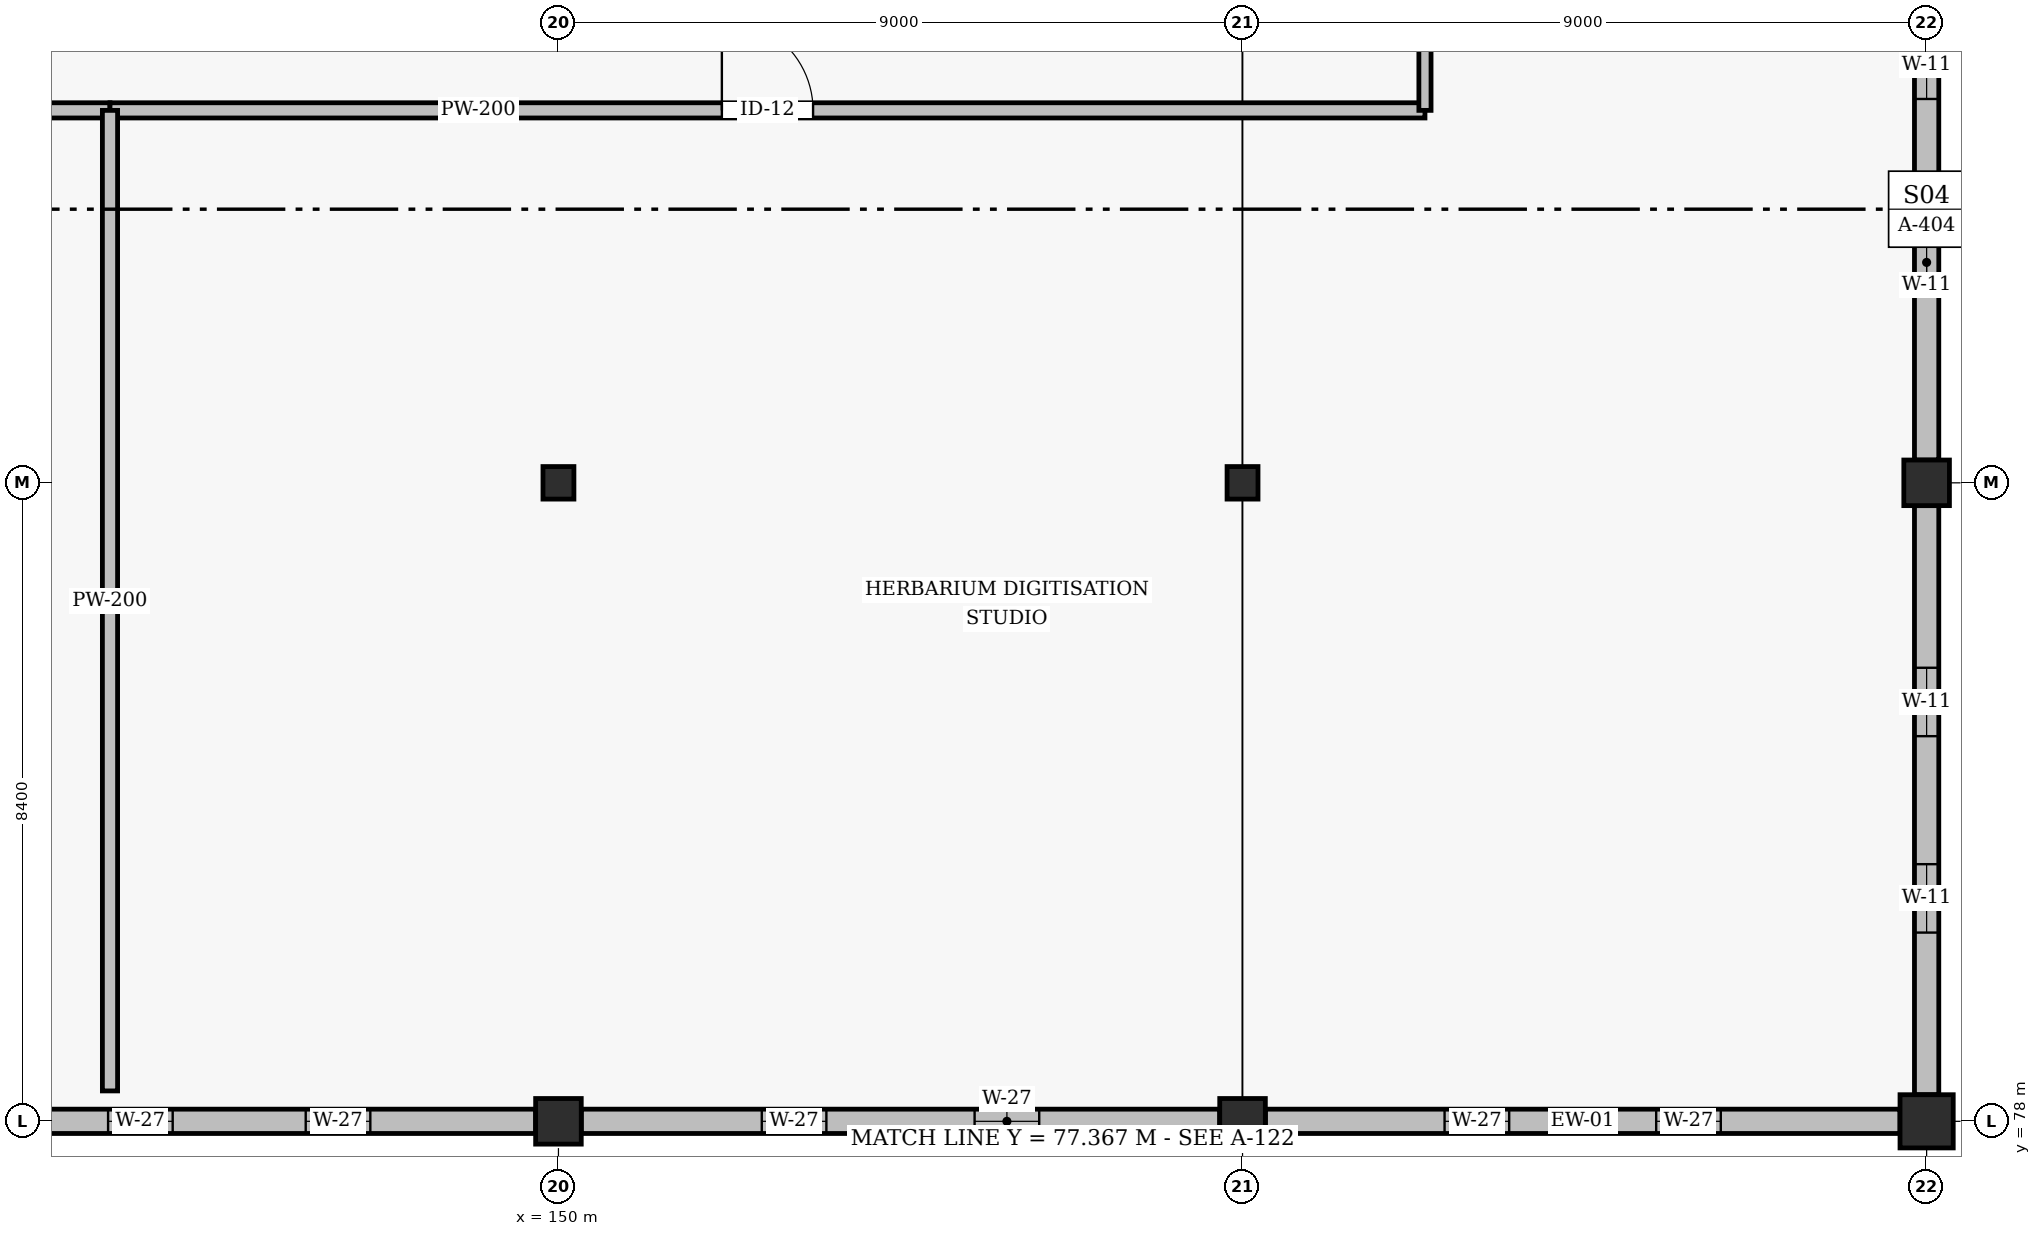
"""IFC4 building model, lengths in metres.
Left out: names, types, materials, properties, quantities, classifications, styles, units other than length and angle.
Written with IfcOpenShell. Run it as: python <this file> out.ifc"""

import sys

from ifc_helpers import new_model, si_unit, direction, frame, frame_2d, origin, origin_2d, place, context, subcontext, project, spatial, rectangle, hollow_rectangle, i_section, extrude, element, fill, save


model = new_model("IFC4")
c1 = context("Model", 3, precision=1e-05, world=origin(), true_north=direction((0.0, 1.0)))
c2 = subcontext(c1, "Body", "Model", "MODEL_VIEW")
j1 = project(units=[si_unit("LENGTHUNIT", "METRE"), si_unit("PLANEANGLEUNIT", "RADIAN")], contexts=[c1])
p1 = place(None, origin())
s1 = spatial("IfcSite", under=j1, at=p1, CompositionType="ELEMENT")
p2 = place(p1, origin())
s2 = spatial("IfcBuilding", under=s1, at=p2, CompositionType="ELEMENT")
p3 = place(p2, frame((0.0, 0.0, 4.8)))
s3 = spatial("IfcBuildingStorey", under=s2, at=p3, CompositionType="ELEMENT", Elevation=4.8)
p4 = place(p3, frame((150.0, 78.0, 0.0), z_axis=(0.0, 0.0, 1.0), x_axis=(1.0, 0.0, 0.0)))
e1 = element("IfcColumn", 1, at=p4, inside=s3, PredefinedType="COLUMN", context=c2, shape_type="SweptSolid", body=[
    extrude(hollow_rectangle(XDim=0.6, YDim=0.6, WallThickness=0.025, InnerFilletRadius=0.025, OuterFilletRadius=0.05, at=origin_2d()), origin(), (0.0, 0.0, 1.0), 4.2),
])
p5 = place(p3, frame((150.0, 86.4, 0.0), z_axis=(0.0, 0.0, 1.0), x_axis=(1.0, 0.0, 0.0)))
e2 = element("IfcColumn", 2, at=p5, inside=s3, PredefinedType="COLUMN", context=c2, shape_type="SweptSolid", body=[
    extrude(i_section(OverallWidth=0.407, OverallDepth=0.428, WebThickness=0.02, FlangeThickness=0.035, FilletRadius=0.022, at=origin_2d()), origin(), (0.0, 0.0, 1.0), 4.2),
])
p6 = place(p3, frame((159.0, 78.0, 0.0), z_axis=(0.0, 0.0, 1.0), x_axis=(1.0, 0.0, 0.0)))
e3 = element("IfcColumn", 3, at=p6, inside=s3, PredefinedType="COLUMN", context=c2, shape_type="SweptSolid", body=[
    extrude(hollow_rectangle(XDim=0.6, YDim=0.6, WallThickness=0.025, InnerFilletRadius=0.025, OuterFilletRadius=0.05, at=origin_2d()), origin(), (0.0, 0.0, 1.0), 4.2),
])
p7 = place(p3, frame((159.0, 86.4, 0.0), z_axis=(0.0, 0.0, 1.0), x_axis=(1.0, 0.0, 0.0)))
e4 = element("IfcColumn", 4, at=p7, inside=s3, PredefinedType="COLUMN", context=c2, shape_type="SweptSolid", body=[
    extrude(i_section(OverallWidth=0.407, OverallDepth=0.428, WebThickness=0.02, FlangeThickness=0.035, FilletRadius=0.022, at=origin_2d()), origin(), (0.0, 0.0, 1.0), 4.2),
])
p8 = place(p3, frame((168.0, 78.0, 0.0), z_axis=(0.0, 0.0, 1.0), x_axis=(1.0, 0.0, 0.0)))
e5 = element("IfcColumn", 5, at=p8, inside=s3, PredefinedType="COLUMN", context=c2, shape_type="SweptSolid", body=[
    extrude(hollow_rectangle(XDim=0.7, YDim=0.7, WallThickness=0.032, InnerFilletRadius=0.032, OuterFilletRadius=0.064, at=origin_2d()), origin(), (0.0, 0.0, 1.0), 4.2),
])
p9 = place(p3, frame((168.0, 86.4, 0.0), z_axis=(0.0, 0.0, 1.0), x_axis=(1.0, 0.0, 0.0)))
e6 = element("IfcColumn", 6, at=p9, inside=s3, PredefinedType="COLUMN", context=c2, shape_type="SweptSolid", body=[
    extrude(hollow_rectangle(XDim=0.6, YDim=0.6, WallThickness=0.025, InnerFilletRadius=0.025, OuterFilletRadius=0.05, at=origin_2d()), origin(), (0.0, 0.0, 1.0), 4.2),
])
p10 = place(p3, frame((141.9, 78.0, 0.0), z_axis=(0.0, 0.0, 1.0), x_axis=(1.0, 0.0, 0.0)))
e7 = element("IfcWall", 7, at=p10, inside=s3, PredefinedType="SOLIDWALL", context=c2, shape_type="SweptSolid", body=[
    extrude(rectangle(XDim=7.8, YDim=0.32, at=frame_2d((3.9, 0.0))), origin(), (0.0, 0.0, 1.0), 3.263),
])
p11 = place(p10, frame((2.175, 0.0, 1.1)))
e8 = element("IfcOpeningElement", 8, at=p11, cuts=e7, PredefinedType="OPENING", context=c2, shape_type="SweptSolid", body=[
    extrude(rectangle(XDim=0.85, YDim=1.45, at=frame_2d((0.425, 0.725))), frame((0.0, 0.17, 0.0), z_axis=(0.0, -1.0, 0.0), x_axis=(1.0, 0.0, 0.0)), (0.0, 0.0, 1.0), 0.34),
])
p12 = place(p10, frame((4.775, 0.0, 1.1)))
e9 = element("IfcOpeningElement", 9, at=p12, cuts=e7, PredefinedType="OPENING", context=c2, shape_type="SweptSolid", body=[
    extrude(rectangle(XDim=0.85, YDim=1.45, at=frame_2d((0.425, 0.725))), frame((0.0, 0.17, 0.0), z_axis=(0.0, -1.0, 0.0), x_axis=(1.0, 0.0, 0.0)), (0.0, 0.0, 1.0), 0.34),
])
p13 = place(p3, frame((150.3, 78.0, 0.0), z_axis=(0.0, 0.0, 1.0), x_axis=(1.0, 0.0, 0.0)))
e10 = element("IfcWall", 10, at=p13, inside=s3, PredefinedType="SOLIDWALL", context=c2, shape_type="SweptSolid", body=[
    extrude(rectangle(XDim=8.4, YDim=0.32, at=frame_2d((4.2, 0.0))), origin(), (0.0, 0.0, 1.0), 3.163),
])
p14 = place(p13, frame((2.375, 0.0, 1.1)))
e11 = element("IfcOpeningElement", 11, at=p14, cuts=e10, PredefinedType="OPENING", context=c2, shape_type="SweptSolid", body=[
    extrude(rectangle(XDim=0.85, YDim=1.45, at=frame_2d((0.425, 0.725))), frame((0.0, 0.17, 0.0), z_axis=(0.0, -1.0, 0.0), x_axis=(1.0, 0.0, 0.0)), (0.0, 0.0, 1.0), 0.34),
])
p15 = place(p13, frame((5.175, 0.0, 1.1)))
e12 = element("IfcOpeningElement", 12, at=p15, cuts=e10, PredefinedType="OPENING", context=c2, shape_type="SweptSolid", body=[
    extrude(rectangle(XDim=0.85, YDim=1.45, at=frame_2d((0.425, 0.725))), frame((0.0, 0.17, 0.0), z_axis=(0.0, -1.0, 0.0), x_axis=(1.0, 0.0, 0.0)), (0.0, 0.0, 1.0), 0.34),
])
p16 = place(p3, frame((159.3, 78.0, 0.0), z_axis=(0.0, 0.0, 1.0), x_axis=(1.0, 0.0, 0.0)))
e13 = element("IfcWall", 13, at=p16, inside=s3, PredefinedType="SOLIDWALL", context=c2, shape_type="SweptSolid", body=[
    extrude(rectangle(XDim=8.35, YDim=0.32, at=frame_2d((4.175, 0.0))), origin(), (0.0, 0.0, 1.0), 3.163),
])
p17 = place(p16, frame((2.358, 0.0, 1.1)))
e14 = element("IfcOpeningElement", 14, at=p17, cuts=e13, PredefinedType="OPENING", context=c2, shape_type="SweptSolid", body=[
    extrude(rectangle(XDim=0.85, YDim=1.45, at=frame_2d((0.425, 0.725))), frame((0.0, 0.17, 0.0), z_axis=(0.0, -1.0, 0.0), x_axis=(1.0, 0.0, 0.0)), (0.0, 0.0, 1.0), 0.34),
])
p18 = place(p16, frame((5.142, 0.0, 1.1)))
e15 = element("IfcOpeningElement", 15, at=p18, cuts=e13, PredefinedType="OPENING", context=c2, shape_type="SweptSolid", body=[
    extrude(rectangle(XDim=0.85, YDim=1.45, at=frame_2d((0.425, 0.725))), frame((0.0, 0.17, 0.0), z_axis=(0.0, -1.0, 0.0), x_axis=(1.0, 0.0, 0.0)), (0.0, 0.0, 1.0), 0.34),
])
p19 = place(p3, frame((168.0, 78.35, 0.0), z_axis=(0.0, 0.0, 1.0), x_axis=(0.0, 1.0, 0.0)))
e16 = element("IfcWall", 16, at=p19, inside=s3, PredefinedType="SOLIDWALL", context=c2, shape_type="SweptSolid", body=[
    extrude(rectangle(XDim=7.75, YDim=0.32, at=frame_2d((3.875, 0.0))), origin(), (0.0, 0.0, 1.0), 3.455),
])
p20 = place(p19, frame((2.133, 0.0, 1.1)))
e17 = element("IfcOpeningElement", 17, at=p20, cuts=e16, PredefinedType="OPENING", context=c2, shape_type="SweptSolid", body=[
    extrude(rectangle(XDim=0.9, YDim=1.5, at=frame_2d((0.45, 0.75))), frame((0.0, 0.17, 0.0), z_axis=(0.0, -1.0, 0.0), x_axis=(1.0, 0.0, 0.0)), (0.0, 0.0, 1.0), 0.34),
])
p21 = place(p19, frame((4.717, 0.0, 1.1)))
e18 = element("IfcOpeningElement", 18, at=p21, cuts=e16, PredefinedType="OPENING", context=c2, shape_type="SweptSolid", body=[
    extrude(rectangle(XDim=0.9, YDim=1.5, at=frame_2d((0.45, 0.75))), frame((0.0, 0.17, 0.0), z_axis=(0.0, -1.0, 0.0), x_axis=(1.0, 0.0, 0.0)), (0.0, 0.0, 1.0), 0.34),
])
p22 = place(p3, frame((168.0, 86.7, 0.0), z_axis=(0.0, 0.0, 1.0), x_axis=(0.0, 1.0, 0.0)))
e19 = element("IfcWall", 19, at=p22, inside=s3, PredefinedType="SOLIDWALL", context=c2, shape_type="SweptSolid", body=[
    extrude(rectangle(XDim=7.8, YDim=0.32, at=frame_2d((3.9, 0.0))), origin(), (0.0, 0.0, 1.0), 3.455),
])
p23 = place(p22, frame((2.15, 0.0, 1.1)))
e20 = element("IfcOpeningElement", 20, at=p23, cuts=e19, PredefinedType="OPENING", context=c2, shape_type="SweptSolid", body=[
    extrude(rectangle(XDim=0.9, YDim=1.5, at=frame_2d((0.45, 0.75))), frame((0.0, 0.17, 0.0), z_axis=(0.0, -1.0, 0.0), x_axis=(1.0, 0.0, 0.0)), (0.0, 0.0, 1.0), 0.34),
])
p24 = place(p22, frame((4.75, 0.0, 1.1)))
e21 = element("IfcOpeningElement", 21, at=p24, cuts=e19, PredefinedType="OPENING", context=c2, shape_type="SweptSolid", body=[
    extrude(rectangle(XDim=0.9, YDim=1.5, at=frame_2d((0.45, 0.75))), frame((0.0, 0.17, 0.0), z_axis=(0.0, -1.0, 0.0), x_axis=(1.0, 0.0, 0.0)), (0.0, 0.0, 1.0), 0.34),
])
p25 = place(p3, frame((116.8, 91.3, 0.0), z_axis=(0.0, 0.0, 1.0), x_axis=(1.0, 0.0, 0.0)))
e22 = element("IfcWall", 22, at=p25, inside=s3, PredefinedType="SOLIDWALL", context=c2, shape_type="SweptSolid", body=[
    extrude(rectangle(XDim=27.3, YDim=0.2, at=frame_2d((13.65, 0.0))), origin(), (0.0, 0.0, 1.0), 3.455),
])
p26 = place(p25, frame((12.95, 0.0, 0.0)))
e23 = element("IfcOpeningElement", 23, at=p26, cuts=e22, PredefinedType="OPENING", context=c2, shape_type="SweptSolid", body=[
    extrude(rectangle(XDim=1.42, YDim=2.18, at=frame_2d((0.71, 1.09))), frame((0.0, 0.11, 0.0), z_axis=(0.0, -1.0, 0.0), x_axis=(1.0, 0.0, 0.0)), (0.0, 0.0, 1.0), 0.22),
])
p27 = place(p3, frame((144.1, 91.3, 0.0), z_axis=(0.0, 0.0, 1.0), x_axis=(1.0, 0.0, 0.0)))
e24 = element("IfcWall", 24, at=p27, inside=s3, PredefinedType="SOLIDWALL", context=c2, shape_type="SweptSolid", body=[
    extrude(rectangle(XDim=17.3, YDim=0.2, at=frame_2d((8.65, 0.0))), origin(), (0.0, 0.0, 1.0), 3.455),
])
p28 = place(p27, frame((8.05, 0.0, 0.0)))
e25 = element("IfcOpeningElement", 25, at=p28, cuts=e24, PredefinedType="OPENING", context=c2, shape_type="SweptSolid", body=[
    extrude(rectangle(XDim=1.2, YDim=2.08, at=frame_2d((0.6, 1.04))), frame((0.0, 0.11, 0.0), z_axis=(0.0, -1.0, 0.0), x_axis=(1.0, 0.0, 0.0)), (0.0, 0.0, 1.0), 0.22),
])
p29 = place(p3, frame((144.1, 78.4, 0.0), z_axis=(0.0, 0.0, 1.0), x_axis=(0.0, 1.0, 0.0)))
e26 = element("IfcWall", 26, at=p29, inside=s3, PredefinedType="SOLIDWALL", context=c2, shape_type="SweptSolid", body=[
    extrude(rectangle(XDim=12.9, YDim=0.2, at=frame_2d((6.45, 0.0))), origin(), (0.0, 0.0, 1.0), 3.459),
])
p30 = place(p3, frame((161.4, 91.3, 0.0), z_axis=(0.0, 0.0, 1.0), x_axis=(0.0, 1.0, 0.0)))
e27 = element("IfcWall", 27, at=p30, inside=s3, PredefinedType="PARTITIONING", context=c2, shape_type="SweptSolid", body=[
    extrude(rectangle(XDim=15.1, YDim=0.16, at=frame_2d((7.55, 0.0))), origin(), (0.0, 0.0, 1.0), 3.305),
])
p31 = place(p30, frame((7.0, 0.0, 0.0)))
e28 = element("IfcOpeningElement", 28, at=p31, cuts=e27, PredefinedType="OPENING", context=c2, shape_type="SweptSolid", body=[
    extrude(rectangle(XDim=1.08, YDim=2.08, at=frame_2d((0.54, 1.04))), frame((0.0, 0.09, 0.0), z_axis=(0.0, -1.0, 0.0), x_axis=(1.0, 0.0, 0.0)), (0.0, 0.0, 1.0), 0.18),
])
p32 = place(p11, origin())
e29 = element("IfcWindow", 29, at=p32, inside=s3, PartitioningType="SINGLE_PANEL", PredefinedType="WINDOW", context=c2, shape_type="SweptSolid", body=[
    extrude(rectangle(XDim=0.85, YDim=1.45, at=frame_2d((0.425, 0.725))), frame((0.0, 0.03, 0.0), z_axis=(0.0, -1.0, 0.0), x_axis=(1.0, 0.0, 0.0)), (0.0, 0.0, 1.0), 0.06),
])
fill(e8, e29)
p33 = place(p12, origin())
e30 = element("IfcWindow", 30, at=p33, inside=s3, PartitioningType="SINGLE_PANEL", PredefinedType="WINDOW", context=c2, shape_type="SweptSolid", body=[
    extrude(rectangle(XDim=0.85, YDim=1.45, at=frame_2d((0.425, 0.725))), frame((0.0, 0.03, 0.0), z_axis=(0.0, -1.0, 0.0), x_axis=(1.0, 0.0, 0.0)), (0.0, 0.0, 1.0), 0.06),
])
fill(e9, e30)
p34 = place(p14, origin())
e31 = element("IfcWindow", 31, at=p34, inside=s3, PartitioningType="SINGLE_PANEL", PredefinedType="WINDOW", context=c2, shape_type="SweptSolid", body=[
    extrude(rectangle(XDim=0.85, YDim=1.45, at=frame_2d((0.425, 0.725))), frame((0.0, 0.03, 0.0), z_axis=(0.0, -1.0, 0.0), x_axis=(1.0, 0.0, 0.0)), (0.0, 0.0, 1.0), 0.06),
])
fill(e11, e31)
p35 = place(p15, origin())
e32 = element("IfcWindow", 32, at=p35, inside=s3, PartitioningType="SINGLE_PANEL", PredefinedType="WINDOW", context=c2, shape_type="SweptSolid", body=[
    extrude(rectangle(XDim=0.85, YDim=1.45, at=frame_2d((0.425, 0.725))), frame((0.0, 0.03, 0.0), z_axis=(0.0, -1.0, 0.0), x_axis=(1.0, 0.0, 0.0)), (0.0, 0.0, 1.0), 0.06),
])
fill(e12, e32)
p36 = place(p17, origin())
e33 = element("IfcWindow", 33, at=p36, inside=s3, PartitioningType="SINGLE_PANEL", PredefinedType="WINDOW", context=c2, shape_type="SweptSolid", body=[
    extrude(rectangle(XDim=0.85, YDim=1.45, at=frame_2d((0.425, 0.725))), frame((0.0, 0.03, 0.0), z_axis=(0.0, -1.0, 0.0), x_axis=(1.0, 0.0, 0.0)), (0.0, 0.0, 1.0), 0.06),
])
fill(e14, e33)
p37 = place(p18, origin())
e34 = element("IfcWindow", 34, at=p37, inside=s3, PartitioningType="SINGLE_PANEL", PredefinedType="WINDOW", context=c2, shape_type="SweptSolid", body=[
    extrude(rectangle(XDim=0.85, YDim=1.45, at=frame_2d((0.425, 0.725))), frame((0.0, 0.03, 0.0), z_axis=(0.0, -1.0, 0.0), x_axis=(1.0, 0.0, 0.0)), (0.0, 0.0, 1.0), 0.06),
])
fill(e15, e34)
p38 = place(p20, origin())
e35 = element("IfcWindow", 35, at=p38, inside=s3, PartitioningType="SINGLE_PANEL", PredefinedType="WINDOW", context=c2, shape_type="SweptSolid", body=[
    extrude(rectangle(XDim=0.9, YDim=1.5, at=frame_2d((0.45, 0.75))), frame((0.0, 0.03, 0.0), z_axis=(0.0, -1.0, 0.0), x_axis=(1.0, 0.0, 0.0)), (0.0, 0.0, 1.0), 0.06),
])
fill(e17, e35)
p39 = place(p21, origin())
e36 = element("IfcWindow", 36, at=p39, inside=s3, PartitioningType="SINGLE_PANEL", PredefinedType="WINDOW", context=c2, shape_type="SweptSolid", body=[
    extrude(rectangle(XDim=0.9, YDim=1.5, at=frame_2d((0.45, 0.75))), frame((0.0, 0.03, 0.0), z_axis=(0.0, -1.0, 0.0), x_axis=(1.0, 0.0, 0.0)), (0.0, 0.0, 1.0), 0.06),
])
fill(e18, e36)
p40 = place(p23, origin())
e37 = element("IfcWindow", 37, at=p40, inside=s3, PartitioningType="SINGLE_PANEL", PredefinedType="WINDOW", context=c2, shape_type="SweptSolid", body=[
    extrude(rectangle(XDim=0.9, YDim=1.5, at=frame_2d((0.45, 0.75))), frame((0.0, 0.03, 0.0), z_axis=(0.0, -1.0, 0.0), x_axis=(1.0, 0.0, 0.0)), (0.0, 0.0, 1.0), 0.06),
])
fill(e20, e37)
p41 = place(p24, origin())
e38 = element("IfcWindow", 38, at=p41, inside=s3, PartitioningType="SINGLE_PANEL", PredefinedType="WINDOW", context=c2, shape_type="SweptSolid", body=[
    extrude(rectangle(XDim=0.9, YDim=1.5, at=frame_2d((0.45, 0.75))), frame((0.0, 0.03, 0.0), z_axis=(0.0, -1.0, 0.0), x_axis=(1.0, 0.0, 0.0)), (0.0, 0.0, 1.0), 0.06),
])
fill(e21, e38)
p42 = place(p28, origin())
e39 = element("IfcDoor", 39, at=p42, inside=s3, OperationType="SINGLE_SWING_LEFT", PredefinedType="DOOR", context=c2, shape_type="SweptSolid", body=[
    extrude(rectangle(XDim=1.2, YDim=2.08, at=frame_2d((0.6, 1.04))), frame((0.0, 0.025, 0.0), z_axis=(0.0, -1.0, 0.0), x_axis=(1.0, 0.0, 0.0)), (0.0, 0.0, 1.0), 0.05),
])
fill(e25, e39)
save(model, sys.argv[1])
